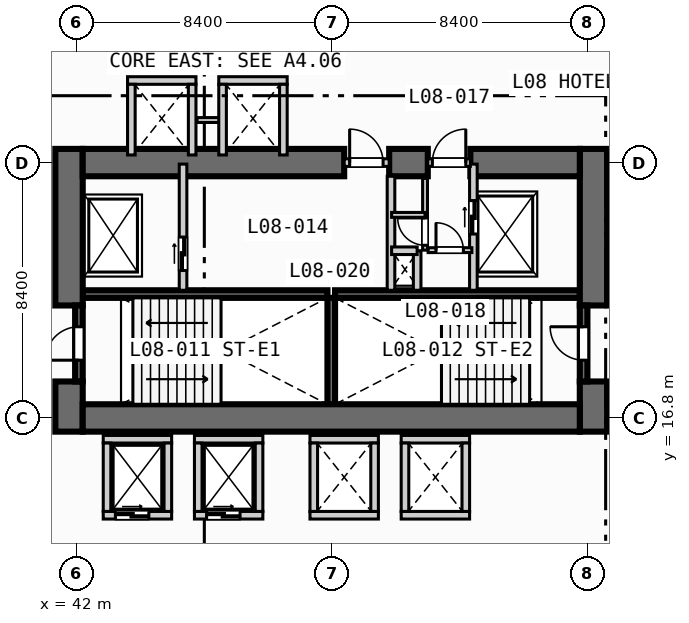
"""IFC4 building model, lengths in metres.
Left out: names, types, materials, properties, quantities, classifications, styles, units other than length and angle.
Written with IfcOpenShell. Run it as: python <this file> out.ifc"""

import sys

from ifc_helpers import new_model, si_unit, direction, frame, frame_2d, origin, place, context, subcontext, project, spatial, rectangle, extrude, element, fill, save


model = new_model("IFC4")
c1 = context("Model", 3, precision=1e-05, world=origin(), true_north=direction((0.0, 1.0)))
c2 = subcontext(c1, "Body", "Model", "MODEL_VIEW")
j1 = project(units=[si_unit("LENGTHUNIT", "METRE"), si_unit("PLANEANGLEUNIT", "RADIAN")], contexts=[c1])
p1 = place(None, origin())
s1 = spatial("IfcSite", under=j1, at=p1, CompositionType="ELEMENT")
p2 = place(p1, origin())
s2 = spatial("IfcBuilding", under=s1, at=p2, CompositionType="ELEMENT")
p3 = place(p2, frame((0.0, 0.0, 39.6)))
s3 = spatial("IfcBuildingStorey", under=s2, at=p3, CompositionType="ELEMENT", Elevation=39.6)
for number, where, z_axis, x_axis in (
    (1, (42.2, 20.875, 0.0), (0.0, 0.0, 1.0), (1.0, 0.0, 0.0)),
    (2, (50.5, 20.875, 0.0), (0.0, 0.0, 1.0), (1.0, 0.0, 0.0)),
):
    element("IfcWall", number, at=place(p3, frame(where, z_axis=z_axis, x_axis=x_axis)), inside=s3, PredefinedType="SOLIDWALL", context=c2, shape_type="SweptSolid", body=[
        extrude(rectangle(XDim=8.05, YDim=0.25, at=frame_2d((4.025, 0.0))), origin(), (0.0, 0.0, 1.0), 3.55),
    ])
p4 = place(p3, frame((50.375, 17.25, 0.0), z_axis=(0.0, 0.0, 1.0), x_axis=(0.0, 1.0, 0.0)))
e3 = element("IfcWall", 3, at=p4, inside=s3, PredefinedType="SOLIDWALL", context=c2, shape_type="SweptSolid", body=[
    extrude(rectangle(XDim=3.5, YDim=0.25, at=frame_2d((1.75, 0.0))), origin(), (0.0, 0.0, 1.0), 3.55),
])
p5 = place(p3, frame((41.75, 16.35, 0.0), z_axis=(0.0, 0.0, 1.0), x_axis=(0.0, 1.0, 0.0)))
e4 = element("IfcWall", 4, at=p5, inside=s3, PredefinedType="SHEAR", context=c2, shape_type="SweptSolid", body=[
    extrude(rectangle(XDim=1.65, YDim=0.9, at=frame_2d((0.825, 0.0))), origin(), (0.0, 0.0, 1.0), 3.55),
])
p6 = place(p3, frame((41.75, 20.5, 0.0), z_axis=(0.0, 0.0, 1.0), x_axis=(0.0, 1.0, 0.0)))
e5 = element("IfcWall", 5, at=p6, inside=s3, PredefinedType="SHEAR", context=c2, shape_type="SweptSolid", body=[
    extrude(rectangle(XDim=5.15, YDim=0.9, at=frame_2d((2.575, 0.0))), origin(), (0.0, 0.0, 1.0), 3.55),
])
p7 = place(p3, frame((59.0, 16.35, 0.0), z_axis=(0.0, 0.0, 1.0), x_axis=(0.0, 1.0, 0.0)))
e6 = element("IfcWall", 6, at=p7, inside=s3, PredefinedType="SHEAR", context=c2, shape_type="SweptSolid", body=[
    extrude(rectangle(XDim=1.65, YDim=0.9, at=frame_2d((0.825, 0.0))), origin(), (0.0, 0.0, 1.0), 3.55),
])
p8 = place(p3, frame((59.0, 20.5, 0.0), z_axis=(0.0, 0.0, 1.0), x_axis=(0.0, 1.0, 0.0)))
e7 = element("IfcWall", 7, at=p8, inside=s3, PredefinedType="SHEAR", context=c2, shape_type="SweptSolid", body=[
    extrude(rectangle(XDim=5.15, YDim=0.9, at=frame_2d((2.575, 0.0))), origin(), (0.0, 0.0, 1.0), 3.55),
])
p9 = place(p3, frame((42.2, 16.8, 0.0), z_axis=(0.0, 0.0, 1.0), x_axis=(1.0, 0.0, 0.0)))
e8 = element("IfcWall", 8, at=p9, inside=s3, PredefinedType="SHEAR", context=c2, shape_type="SweptSolid", body=[
    extrude(rectangle(XDim=16.35, YDim=0.9, at=frame_2d((8.175, 0.0))), origin(), (0.0, 0.0, 1.0), 3.55),
])
p10 = place(p3, frame((42.2, 25.2, 0.0), z_axis=(0.0, 0.0, 1.0), x_axis=(1.0, 0.0, 0.0)))
e9 = element("IfcWall", 9, at=p10, inside=s3, PredefinedType="SHEAR", context=c2, shape_type="SweptSolid", body=[
    extrude(rectangle(XDim=8.6, YDim=0.9, at=frame_2d((4.3, 0.0))), origin(), (0.0, 0.0, 1.0), 3.55),
])
p11 = place(p3, frame((52.28, 25.2, 0.0), z_axis=(0.0, 0.0, 1.0), x_axis=(1.0, 0.0, 0.0)))
e10 = element("IfcWall", 10, at=p11, inside=s3, PredefinedType="SHEAR", context=c2, shape_type="SweptSolid", body=[
    extrude(rectangle(XDim=1.27, YDim=0.9, at=frame_2d((0.635, 0.0))), origin(), (0.0, 0.0, 1.0), 3.55),
])
p12 = place(p3, frame((54.95, 25.2, 0.0), z_axis=(0.0, 0.0, 1.0), x_axis=(1.0, 0.0, 0.0)))
e11 = element("IfcWall", 11, at=p12, inside=s3, PredefinedType="SHEAR", context=c2, shape_type="SweptSolid", body=[
    extrude(rectangle(XDim=3.6, YDim=0.9, at=frame_2d((1.8, 0.0))), origin(), (0.0, 0.0, 1.0), 3.55),
])
p13 = place(p3, frame((42.075, 18.0, 0.0), z_axis=(0.0, 0.0, 1.0), x_axis=(0.0, 1.0, 0.0)))
e12 = element("IfcWall", 12, at=p13, inside=s3, PredefinedType="SOLIDWALL", context=c2, shape_type="SweptSolid", body=[
    extrude(rectangle(XDim=2.5, YDim=0.25, at=frame_2d((1.25, 0.0))), origin(), (0.0, 0.0, 1.0), 3.55),
])
p14 = place(p13, frame((0.7, 0.0, 0.0)))
e13 = element("IfcOpeningElement", 13, at=p14, cuts=e12, PredefinedType="OPENING", context=c2, shape_type="SweptSolid", body=[
    extrude(rectangle(XDim=1.1, YDim=2.15, at=frame_2d((0.55, 1.075))), frame((0.0, 0.135, 0.0), z_axis=(0.0, -1.0, 0.0), x_axis=(1.0, 0.0, 0.0)), (0.0, 0.0, 1.0), 0.27),
])
p15 = place(p3, frame((58.675, 18.0, 0.0), z_axis=(0.0, 0.0, 1.0), x_axis=(0.0, 1.0, 0.0)))
e14 = element("IfcWall", 14, at=p15, inside=s3, PredefinedType="SOLIDWALL", context=c2, shape_type="SweptSolid", body=[
    extrude(rectangle(XDim=2.5, YDim=0.25, at=frame_2d((1.25, 0.0))), origin(), (0.0, 0.0, 1.0), 3.55),
])
p16 = place(p15, frame((0.7, 0.0, 0.0)))
e15 = element("IfcOpeningElement", 15, at=p16, cuts=e14, PredefinedType="OPENING", context=c2, shape_type="SweptSolid", body=[
    extrude(rectangle(XDim=1.1, YDim=2.15, at=frame_2d((0.55, 1.075))), frame((0.0, 0.135, 0.0), z_axis=(0.0, -1.0, 0.0), x_axis=(1.0, 0.0, 0.0)), (0.0, 0.0, 1.0), 0.27),
])
p17 = place(p3, frame((45.5, 21.0, 0.0), z_axis=(0.0, 0.0, 1.0), x_axis=(0.0, 1.0, 0.0)))
e16 = element("IfcWall", 16, at=p17, inside=s3, PredefinedType="SOLIDWALL", context=c2, shape_type="SweptSolid", body=[
    extrude(rectangle(XDim=4.15, YDim=0.25, at=frame_2d((2.075, 0.0))), origin(), (0.0, 0.0, 1.0), 3.55),
])
p18 = place(p17, frame((0.65, 0.0, 0.0)))
e17 = element("IfcOpeningElement", 17, at=p18, cuts=e16, PredefinedType="OPENING", context=c2, shape_type="SweptSolid", body=[
    extrude(rectangle(XDim=1.1, YDim=2.15, at=frame_2d((0.55, 1.075))), frame((0.0, 0.135, 0.0), z_axis=(0.0, -1.0, 0.0), x_axis=(1.0, 0.0, 0.0)), (0.0, 0.0, 1.0), 0.27),
])
p19 = place(p3, frame((50.8, 25.2, 0.0), z_axis=(0.0, 0.0, 1.0), x_axis=(1.0, 0.0, 0.0)))
e18 = element("IfcWall", 18, at=p19, inside=s3, PredefinedType="SOLIDWALL", context=c2, shape_type="SweptSolid", body=[
    extrude(rectangle(XDim=1.48, YDim=0.25, at=frame_2d((0.74, 0.0))), origin(), (0.0, 0.0, 1.0), 3.55),
])
p20 = place(p19, frame((0.18, 0.0, 0.0)))
e19 = element("IfcOpeningElement", 19, at=p20, cuts=e18, PredefinedType="OPENING", context=c2, shape_type="SweptSolid", body=[
    extrude(rectangle(XDim=1.1, YDim=2.15, at=frame_2d((0.55, 1.075))), frame((0.0, 0.135, 0.0), z_axis=(0.0, -1.0, 0.0), x_axis=(1.0, 0.0, 0.0)), (0.0, 0.0, 1.0), 0.27),
])
p21 = place(p3, frame((52.34, 21.0, 0.0), z_axis=(0.0, 0.0, 1.0), x_axis=(0.0, 1.0, 0.0)))
e20 = element("IfcWall", 20, at=p21, inside=s3, PredefinedType="SOLIDWALL", context=c2, shape_type="SweptSolid", body=[
    extrude(rectangle(XDim=3.75, YDim=0.25, at=frame_2d((1.875, 0.0))), origin(), (0.0, 0.0, 1.0), 3.55),
])
p22 = place(p3, frame((55.05, 21.0, 0.0), z_axis=(0.0, 0.0, 1.0), x_axis=(0.0, 1.0, 0.0)))
e21 = element("IfcWall", 21, at=p22, inside=s3, PredefinedType="SOLIDWALL", context=c2, shape_type="SweptSolid", body=[
    extrude(rectangle(XDim=4.15, YDim=0.25, at=frame_2d((2.075, 0.0))), origin(), (0.0, 0.0, 1.0), 3.55),
])
p23 = place(p22, frame((1.85, 0.0, 0.0)))
e22 = element("IfcOpeningElement", 22, at=p23, cuts=e21, PredefinedType="OPENING", context=c2, shape_type="SweptSolid", body=[
    extrude(rectangle(XDim=1.1, YDim=2.15, at=frame_2d((0.55, 1.075))), frame((0.0, 0.135, 0.0), z_axis=(0.0, -1.0, 0.0), x_axis=(1.0, 0.0, 0.0)), (0.0, 0.0, 1.0), 0.27),
])
p24 = place(p3, frame((53.55, 25.2, 0.0), z_axis=(0.0, 0.0, 1.0), x_axis=(1.0, 0.0, 0.0)))
e23 = element("IfcWall", 23, at=p24, inside=s3, PredefinedType="SOLIDWALL", context=c2, shape_type="SweptSolid", body=[
    extrude(rectangle(XDim=1.4, YDim=0.25, at=frame_2d((0.7, 0.0))), origin(), (0.0, 0.0, 1.0), 3.55),
])
p25 = place(p24, frame((0.15, 0.0, 0.0)))
e24 = element("IfcOpeningElement", 24, at=p25, cuts=e23, PredefinedType="OPENING", context=c2, shape_type="SweptSolid", body=[
    extrude(rectangle(XDim=1.1, YDim=2.15, at=frame_2d((0.55, 1.075))), frame((0.0, 0.135, 0.0), z_axis=(0.0, -1.0, 0.0), x_axis=(1.0, 0.0, 0.0)), (0.0, 0.0, 1.0), 0.27),
])
p26 = place(p3, frame((53.2, 21.0, 0.0), z_axis=(0.0, 0.0, 1.0), x_axis=(0.0, 1.0, 0.0)))
e25 = element("IfcWall", 25, at=p26, inside=s3, PredefinedType="SOLIDWALL", context=c2, shape_type="SweptSolid", body=[
    extrude(rectangle(XDim=1.3, YDim=0.25, at=frame_2d((0.65, 0.0))), origin(), (0.0, 0.0, 1.0), 3.55),
])
p27 = place(p3, frame((52.36, 22.3, 0.0), z_axis=(0.0, 0.0, 1.0), x_axis=(1.0, 0.0, 0.0)))
e26 = element("IfcWall", 26, at=p27, inside=s3, PredefinedType="SOLIDWALL", context=c2, shape_type="SweptSolid", body=[
    extrude(rectangle(XDim=0.84, YDim=0.25, at=frame_2d((0.42, 0.0))), origin(), (0.0, 0.0, 1.0), 3.55),
])
p28 = place(p3, frame((53.56, 22.32, 0.0), z_axis=(0.0, 0.0, 1.0), x_axis=(1.0, 0.0, 0.0)))
e27 = element("IfcWall", 27, at=p28, inside=s3, PredefinedType="PARTITIONING", context=c2, shape_type="SweptSolid", body=[
    extrude(rectangle(XDim=1.44, YDim=0.16, at=frame_2d((0.72, 0.0))), origin(), (0.0, 0.0, 1.0), 3.55),
])
p29 = place(p28, frame((0.26, 0.0, 0.0)))
e28 = element("IfcOpeningElement", 28, at=p29, cuts=e27, PredefinedType="OPENING", context=c2, shape_type="SweptSolid", body=[
    extrude(rectangle(XDim=0.9, YDim=2.1, at=frame_2d((0.45, 1.05))), frame((0.0, 0.09, 0.0), z_axis=(0.0, -1.0, 0.0), x_axis=(1.0, 0.0, 0.0)), (0.0, 0.0, 1.0), 0.18),
])
p30 = place(p3, frame((53.46, 22.32, 0.0), z_axis=(0.0, 0.0, 1.0), x_axis=(0.0, 1.0, 0.0)))
e29 = element("IfcWall", 29, at=p30, inside=s3, PredefinedType="PARTITIONING", context=c2, shape_type="SweptSolid", body=[
    extrude(rectangle(XDim=2.36, YDim=0.16, at=frame_2d((1.18, 0.0))), origin(), (0.0, 0.0, 1.0), 3.55),
])
p31 = place(p30, frame((0.16, 0.0, 0.0)))
e30 = element("IfcOpeningElement", 30, at=p31, cuts=e29, PredefinedType="OPENING", context=c2, shape_type="SweptSolid", body=[
    extrude(rectangle(XDim=0.9, YDim=2.1, at=frame_2d((0.45, 1.05))), frame((0.0, 0.09, 0.0), z_axis=(0.0, -1.0, 0.0), x_axis=(1.0, 0.0, 0.0)), (0.0, 0.0, 1.0), 0.18),
])
p32 = place(p3, frame((52.36, 23.48, 0.0), z_axis=(0.0, 0.0, 1.0), x_axis=(1.0, 0.0, 0.0)))
e31 = element("IfcWall", 31, at=p32, inside=s3, PredefinedType="PARTITIONING", context=c2, shape_type="SweptSolid", body=[
    extrude(rectangle(XDim=1.1, YDim=0.16, at=frame_2d((0.55, 0.0))), origin(), (0.0, 0.0, 1.0), 3.55),
])
p33 = place(p3, frame((42.875, 13.6, 0.0), z_axis=(0.0, 0.0, 1.0), x_axis=(1.0, 0.0, 0.0)))
e32 = element("IfcWall", 32, at=p33, inside=s3, PredefinedType="SOLIDWALL", context=c2, shape_type="SweptSolid", body=[
    extrude(rectangle(XDim=2.25, YDim=0.25, at=frame_2d((1.125, 0.0))), origin(), (0.0, 0.0, 1.0), 3.55),
])
p34 = place(p33, frame((0.4, 0.0, 0.0)))
e33 = element("IfcOpeningElement", 33, at=p34, cuts=e32, PredefinedType="OPENING", context=c2, shape_type="SweptSolid", body=[
    extrude(rectangle(XDim=1.1, YDim=2.15, at=frame_2d((0.55, 1.075))), frame((0.0, 0.135, 0.0), z_axis=(0.0, -1.0, 0.0), x_axis=(1.0, 0.0, 0.0)), (0.0, 0.0, 1.0), 0.27),
])
for number, where, z_axis, x_axis in (
    (34, (42.875, 16.1, 0.0), (0.0, 0.0, 1.0), (1.0, 0.0, 0.0)),
    (35, (43.0, 13.725, 0.0), (0.0, 0.0, 1.0), (0.0, 1.0, 0.0)),
    (36, (45.0, 13.725, 0.0), (0.0, 0.0, 1.0), (0.0, 1.0, 0.0)),
):
    element("IfcWall", number, at=place(p3, frame(where, z_axis=z_axis, x_axis=x_axis)), inside=s3, PredefinedType="SOLIDWALL", context=c2, shape_type="SweptSolid", body=[
        extrude(rectangle(XDim=2.25, YDim=0.25, at=frame_2d((1.125, 0.0))), origin(), (0.0, 0.0, 1.0), 3.55),
    ])
p35 = place(p3, frame((45.875, 13.6, 0.0), z_axis=(0.0, 0.0, 1.0), x_axis=(1.0, 0.0, 0.0)))
e37 = element("IfcWall", 37, at=p35, inside=s3, PredefinedType="SOLIDWALL", context=c2, shape_type="SweptSolid", body=[
    extrude(rectangle(XDim=2.25, YDim=0.25, at=frame_2d((1.125, 0.0))), origin(), (0.0, 0.0, 1.0), 3.55),
])
p36 = place(p35, frame((0.4, 0.0, 0.0)))
e38 = element("IfcOpeningElement", 38, at=p36, cuts=e37, PredefinedType="OPENING", context=c2, shape_type="SweptSolid", body=[
    extrude(rectangle(XDim=1.1, YDim=2.15, at=frame_2d((0.55, 1.075))), frame((0.0, 0.135, 0.0), z_axis=(0.0, -1.0, 0.0), x_axis=(1.0, 0.0, 0.0)), (0.0, 0.0, 1.0), 0.27),
])
for number, where, z_axis, x_axis in (
    (39, (45.875, 16.1, 0.0), (0.0, 0.0, 1.0), (1.0, 0.0, 0.0)),
    (40, (46.0, 13.725, 0.0), (0.0, 0.0, 1.0), (0.0, 1.0, 0.0)),
    (41, (48.0, 13.725, 0.0), (0.0, 0.0, 1.0), (0.0, 1.0, 0.0)),
    (42, (49.675, 13.6, 0.0), (0.0, 0.0, 1.0), (1.0, 0.0, 0.0)),
    (43, (49.675, 16.1, 0.0), (0.0, 0.0, 1.0), (1.0, 0.0, 0.0)),
    (44, (49.8, 13.725, 0.0), (0.0, 0.0, 1.0), (0.0, 1.0, 0.0)),
    (45, (51.8, 13.725, 0.0), (0.0, 0.0, 1.0), (0.0, 1.0, 0.0)),
    (46, (52.675, 13.6, 0.0), (0.0, 0.0, 1.0), (1.0, 0.0, 0.0)),
    (47, (52.675, 16.1, 0.0), (0.0, 0.0, 1.0), (1.0, 0.0, 0.0)),
    (48, (52.8, 13.725, 0.0), (0.0, 0.0, 1.0), (0.0, 1.0, 0.0)),
    (49, (54.8, 13.725, 0.0), (0.0, 0.0, 1.0), (0.0, 1.0, 0.0)),
    (50, (43.675, 27.9, 0.0), (0.0, 0.0, 1.0), (1.0, 0.0, 0.0)),
):
    element("IfcWall", number, at=place(p3, frame(where, z_axis=z_axis, x_axis=x_axis)), inside=s3, PredefinedType="SOLIDWALL", context=c2, shape_type="SweptSolid", body=[
        extrude(rectangle(XDim=2.25, YDim=0.25, at=frame_2d((1.125, 0.0))), origin(), (0.0, 0.0, 1.0), 3.55),
    ])
for number, where, z_axis, x_axis in (
    (51, (43.8, 25.45, 0.0), (0.0, 0.0, 1.0), (0.0, 1.0, 0.0)),
    (52, (45.8, 25.45, 0.0), (0.0, 0.0, 1.0), (0.0, 1.0, 0.0)),
):
    element("IfcWall", number, at=place(p3, frame(where, z_axis=z_axis, x_axis=x_axis)), inside=s3, PredefinedType="SOLIDWALL", context=c2, shape_type="SweptSolid", body=[
        extrude(rectangle(XDim=2.325, YDim=0.25, at=frame_2d((1.163, 0.0))), origin(), (0.0, 0.0, 1.0), 3.55),
    ])
p37 = place(p3, frame((45.96, 26.6, 0.0), z_axis=(0.0, 0.0, 1.0), x_axis=(1.0, 0.0, 0.0)))
e53 = element("IfcWall", 53, at=p37, inside=s3, PredefinedType="PARTITIONING", context=c2, shape_type="SweptSolid", body=[
    extrude(rectangle(XDim=0.88, YDim=0.16, at=frame_2d((0.44, 0.0))), origin(), (0.0, 0.0, 1.0), 3.55),
])
p38 = place(p3, frame((46.675, 27.9, 0.0), z_axis=(0.0, 0.0, 1.0), x_axis=(1.0, 0.0, 0.0)))
e54 = element("IfcWall", 54, at=p38, inside=s3, PredefinedType="SOLIDWALL", context=c2, shape_type="SweptSolid", body=[
    extrude(rectangle(XDim=2.25, YDim=0.25, at=frame_2d((1.125, 0.0))), origin(), (0.0, 0.0, 1.0), 3.55),
])
for number, where, z_axis, x_axis in (
    (55, (46.8, 25.45, 0.0), (0.0, 0.0, 1.0), (0.0, 1.0, 0.0)),
    (56, (48.8, 25.45, 0.0), (0.0, 0.0, 1.0), (0.0, 1.0, 0.0)),
):
    element("IfcWall", number, at=place(p3, frame(where, z_axis=z_axis, x_axis=x_axis)), inside=s3, PredefinedType="SOLIDWALL", context=c2, shape_type="SweptSolid", body=[
        extrude(rectangle(XDim=2.325, YDim=0.25, at=frame_2d((1.163, 0.0))), origin(), (0.0, 0.0, 1.0), 3.55),
    ])
p39 = place(p14, origin())
e57 = element("IfcDoor", 57, at=p39, inside=s3, OperationType="SINGLE_SWING_LEFT", PredefinedType="DOOR", context=c2, shape_type="SweptSolid", body=[
    extrude(rectangle(XDim=1.1, YDim=2.15, at=frame_2d((0.55, 1.075))), frame((0.0, 0.025, 0.0), z_axis=(0.0, -1.0, 0.0), x_axis=(1.0, 0.0, 0.0)), (0.0, 0.0, 1.0), 0.05),
])
fill(e13, e57)
p40 = place(p16, origin())
e58 = element("IfcDoor", 58, at=p40, inside=s3, OperationType="SINGLE_SWING_RIGHT", PredefinedType="DOOR", context=c2, shape_type="SweptSolid", body=[
    extrude(rectangle(XDim=1.1, YDim=2.15, at=frame_2d((0.55, 1.075))), frame((0.0, 0.025, 0.0), z_axis=(0.0, -1.0, 0.0), x_axis=(1.0, 0.0, 0.0)), (0.0, 0.0, 1.0), 0.05),
])
fill(e15, e58)
p41 = place(p18, origin())
e59 = element("IfcDoor", 59, at=p41, inside=s3, OperationType="SLIDING_TO_LEFT", PredefinedType="DOOR", context=c2, shape_type="SweptSolid", body=[
    extrude(rectangle(XDim=1.1, YDim=2.15, at=frame_2d((0.55, 1.075))), frame((0.0, 0.025, 0.0), z_axis=(0.0, -1.0, 0.0), x_axis=(1.0, 0.0, 0.0)), (0.0, 0.0, 1.0), 0.05),
])
fill(e17, e59)
p42 = place(p20, origin())
e60 = element("IfcDoor", 60, at=p42, inside=s3, OperationType="SINGLE_SWING_LEFT", PredefinedType="DOOR", context=c2, shape_type="SweptSolid", body=[
    extrude(rectangle(XDim=1.1, YDim=2.15, at=frame_2d((0.55, 1.075))), frame((0.0, 0.025, 0.0), z_axis=(0.0, -1.0, 0.0), x_axis=(1.0, 0.0, 0.0)), (0.0, 0.0, 1.0), 0.05),
])
fill(e19, e60)
p43 = place(p23, origin())
e61 = element("IfcDoor", 61, at=p43, inside=s3, OperationType="SLIDING_TO_LEFT", PredefinedType="DOOR", context=c2, shape_type="SweptSolid", body=[
    extrude(rectangle(XDim=1.1, YDim=2.15, at=frame_2d((0.55, 1.075))), frame((0.0, 0.025, 0.0), z_axis=(0.0, -1.0, 0.0), x_axis=(1.0, 0.0, 0.0)), (0.0, 0.0, 1.0), 0.05),
])
fill(e22, e61)
p44 = place(p25, origin())
e62 = element("IfcDoor", 62, at=p44, inside=s3, OperationType="SINGLE_SWING_RIGHT", PredefinedType="DOOR", context=c2, shape_type="SweptSolid", body=[
    extrude(rectangle(XDim=1.1, YDim=2.15, at=frame_2d((0.55, 1.075))), frame((0.0, 0.025, 0.0), z_axis=(0.0, -1.0, 0.0), x_axis=(1.0, 0.0, 0.0)), (0.0, 0.0, 1.0), 0.05),
])
fill(e24, e62)
p45 = place(p29, origin())
e63 = element("IfcDoor", 63, at=p45, inside=s3, OperationType="SINGLE_SWING_LEFT", PredefinedType="DOOR", context=c2, shape_type="SweptSolid", body=[
    extrude(rectangle(XDim=0.9, YDim=2.1, at=frame_2d((0.45, 1.05))), frame((0.0, 0.025, 0.0), z_axis=(0.0, -1.0, 0.0), x_axis=(1.0, 0.0, 0.0)), (0.0, 0.0, 1.0), 0.05),
])
fill(e28, e63)
p46 = place(p31, origin())
e64 = element("IfcDoor", 64, at=p46, inside=s3, OperationType="SINGLE_SWING_RIGHT", PredefinedType="DOOR", context=c2, shape_type="SweptSolid", body=[
    extrude(rectangle(XDim=0.9, YDim=2.1, at=frame_2d((0.45, 1.05))), frame((0.0, 0.025, 0.0), z_axis=(0.0, -1.0, 0.0), x_axis=(1.0, 0.0, 0.0)), (0.0, 0.0, 1.0), 0.05),
])
fill(e30, e64)
p47 = place(p34, origin())
e65 = element("IfcDoor", 65, at=p47, inside=s3, OperationType="SLIDING_TO_LEFT", PredefinedType="DOOR", context=c2, shape_type="SweptSolid", body=[
    extrude(rectangle(XDim=1.1, YDim=2.15, at=frame_2d((0.55, 1.075))), frame((0.0, 0.025, 0.0), z_axis=(0.0, -1.0, 0.0), x_axis=(1.0, 0.0, 0.0)), (0.0, 0.0, 1.0), 0.05),
])
fill(e33, e65)
p48 = place(p36, origin())
e66 = element("IfcDoor", 66, at=p48, inside=s3, OperationType="SLIDING_TO_LEFT", PredefinedType="DOOR", context=c2, shape_type="SweptSolid", body=[
    extrude(rectangle(XDim=1.1, YDim=2.15, at=frame_2d((0.55, 1.075))), frame((0.0, 0.025, 0.0), z_axis=(0.0, -1.0, 0.0), x_axis=(1.0, 0.0, 0.0)), (0.0, 0.0, 1.0), 0.05),
])
fill(e38, e66)
save(model, sys.argv[1])
